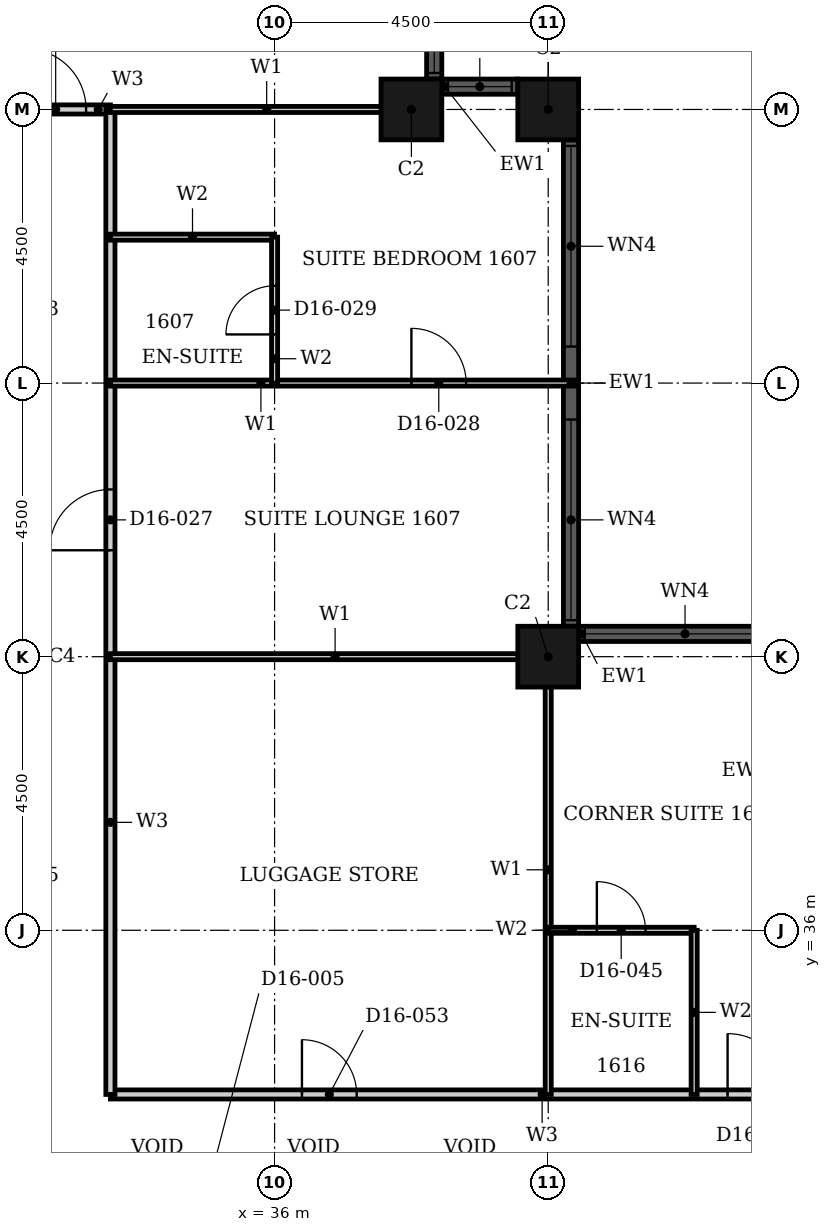
"""IFC4 building model, lengths in metres.
Left out: names, types, materials, properties, quantities, classifications, styles, units other than length and angle.
Written with IfcOpenShell. Run it as: python <this file> out.ifc"""

import sys

from ifc_helpers import new_model, si_unit, direction, frame, frame_2d, origin, origin_2d, place, context, subcontext, project, spatial, rectangle, hollow_rectangle, extrude, element, fill, save


model = new_model("IFC4")
c1 = context("Model", 3, precision=1e-05, world=origin(), true_north=direction((0.0, 1.0)))
c2 = subcontext(c1, "Body", "Model", "MODEL_VIEW")
j1 = project(units=[si_unit("LENGTHUNIT", "METRE"), si_unit("PLANEANGLEUNIT", "RADIAN")], contexts=[c1])
p1 = place(None, origin())
s1 = spatial("IfcSite", under=j1, at=p1, CompositionType="ELEMENT")
p2 = place(p1, origin())
s2 = spatial("IfcBuilding", under=s1, at=p2, CompositionType="ELEMENT")
p3 = place(p2, frame((0.0, 0.0, 70.8)))
s3 = spatial("IfcBuildingStorey", under=s2, at=p3, CompositionType="ELEMENT", Elevation=70.8)
for number, where, z_axis, x_axis in (
    (1, (40.5, 40.5, 0.0), (0.0, 0.0, 1.0), (1.0, 0.0, 0.0)),
    (2, (40.5, 49.5, 0.0), (0.0, 0.0, 1.0), (1.0, 0.0, 0.0)),
    (3, (38.25, 49.5, 0.0), (0.0, 0.0, 1.0), (1.0, 0.0, 0.0)),
):
    element("IfcColumn", number, at=place(p3, frame(where, z_axis=z_axis, x_axis=x_axis)), inside=s3, PredefinedType="COLUMN", context=c2, shape_type="SweptSolid", body=[
        extrude(hollow_rectangle(XDim=1.0, YDim=1.0, WallThickness=0.032, at=origin_2d()), origin(), (0.0, 0.0, 1.0), 3.6),
    ])
p4 = place(p3, frame((44.5, 40.875, 0.0), z_axis=(0.0, 0.0, 1.0), x_axis=(-1.0, 0.0, 0.0)))
e4 = element("IfcWall", 4, at=p4, inside=s3, PredefinedType="SOLIDWALL", context=c2, shape_type="SweptSolid", body=[
    extrude(rectangle(XDim=3.5, YDim=0.25, at=frame_2d((1.75, 0.0))), origin(), (0.0, 0.0, 1.0), 3.6),
])
p5 = place(p4, frame((0.1, 0.0, 0.9)))
e5 = element("IfcOpeningElement", 5, at=p5, cuts=e4, PredefinedType="OPENING", context=c2, shape_type="SweptSolid", body=[
    extrude(rectangle(XDim=3.3, YDim=2.08, at=frame_2d((1.65, 1.04))), frame((0.0, 0.135, 0.0), z_axis=(0.0, -1.0, 0.0), x_axis=(1.0, 0.0, 0.0)), (0.0, 0.0, 1.0), 0.27),
])
p6 = place(p3, frame((40.875, 41.0, 0.0), z_axis=(0.0, 0.0, 1.0), x_axis=(0.0, 1.0, 0.0)))
e6 = element("IfcWall", 6, at=p6, inside=s3, PredefinedType="SOLIDWALL", context=c2, shape_type="SweptSolid", body=[
    extrude(rectangle(XDim=8.0, YDim=0.25, at=frame_2d((4.0, 0.0))), origin(), (0.0, 0.0, 1.0), 3.6),
])
p7 = place(p6, frame((0.1, 0.0, 0.9)))
e7 = element("IfcOpeningElement", 7, at=p7, cuts=e6, PredefinedType="OPENING", context=c2, shape_type="SweptSolid", body=[
    extrude(rectangle(XDim=3.3, YDim=2.08, at=frame_2d((1.65, 1.04))), frame((0.0, 0.135, 0.0), z_axis=(0.0, -1.0, 0.0), x_axis=(1.0, 0.0, 0.0)), (0.0, 0.0, 1.0), 0.27),
])
p8 = place(p6, frame((4.6, 0.0, 0.9)))
e8 = element("IfcOpeningElement", 8, at=p8, cuts=e6, PredefinedType="OPENING", context=c2, shape_type="SweptSolid", body=[
    extrude(rectangle(XDim=3.3, YDim=2.08, at=frame_2d((1.65, 1.04))), frame((0.0, 0.135, 0.0), z_axis=(0.0, -1.0, 0.0), x_axis=(1.0, 0.0, 0.0)), (0.0, 0.0, 1.0), 0.27),
])
p9 = place(p3, frame((40.0, 49.875, 0.0), z_axis=(0.0, 0.0, 1.0), x_axis=(-1.0, 0.0, 0.0)))
e9 = element("IfcWall", 9, at=p9, inside=s3, PredefinedType="SOLIDWALL", context=c2, shape_type="SweptSolid", body=[
    extrude(rectangle(XDim=1.25, YDim=0.25, at=frame_2d((0.625, 0.0))), origin(), (0.0, 0.0, 1.0), 3.6),
])
p10 = place(p9, frame((0.1, 0.0, 0.9)))
e10 = element("IfcOpeningElement", 10, at=p10, cuts=e9, PredefinedType="OPENING", context=c2, shape_type="SweptSolid", body=[
    extrude(rectangle(XDim=1.05, YDim=2.08, at=frame_2d((0.525, 1.04))), frame((0.0, 0.135, 0.0), z_axis=(0.0, -1.0, 0.0), x_axis=(1.0, 0.0, 0.0)), (0.0, 0.0, 1.0), 0.27),
])
p11 = place(p3, frame((38.625, 50.0, 0.0), z_axis=(0.0, 0.0, 1.0), x_axis=(0.0, 1.0, 0.0)))
e11 = element("IfcWall", 11, at=p11, inside=s3, PredefinedType="SOLIDWALL", context=c2, shape_type="SweptSolid", body=[
    extrude(rectangle(XDim=1.25, YDim=0.25, at=frame_2d((0.625, 0.0))), origin(), (0.0, 0.0, 1.0), 3.6),
])
p12 = place(p11, frame((0.1, 0.0, 0.9)))
e12 = element("IfcOpeningElement", 12, at=p12, cuts=e11, PredefinedType="OPENING", context=c2, shape_type="SweptSolid", body=[
    extrude(rectangle(XDim=1.05, YDim=2.08, at=frame_2d((0.525, 1.04))), frame((0.0, 0.135, 0.0), z_axis=(0.0, -1.0, 0.0), x_axis=(1.0, 0.0, 0.0)), (0.0, 0.0, 1.0), 0.27),
])
p13 = place(p3, frame((33.3, 33.3, 0.0), z_axis=(0.0, 0.0, 1.0), x_axis=(1.0, 0.0, 0.0)))
e13 = element("IfcWall", 13, at=p13, inside=s3, PredefinedType="PARTITIONING", context=c2, shape_type="SweptSolid", body=[
    extrude(rectangle(XDim=13.5, YDim=0.15, at=frame_2d((6.75, 0.0))), origin(), (0.0, 0.0, 1.0), 3.3),
])
p14 = place(p13, frame((10.15, 0.0, 0.0)))
e14 = element("IfcOpeningElement", 14, at=p14, cuts=e13, PredefinedType="OPENING", context=c2, shape_type="SweptSolid", body=[
    extrude(rectangle(XDim=1.0, YDim=2.1, at=frame_2d((0.5, 1.05))), frame((0.0, 0.085, 0.0), z_axis=(0.0, -1.0, 0.0), x_axis=(1.0, 0.0, 0.0)), (0.0, 0.0, 1.0), 0.17),
])
p15 = place(p13, frame((3.15, 0.0, 0.0)))
e15 = element("IfcOpeningElement", 15, at=p15, cuts=e13, PredefinedType="OPENING", context=c2, shape_type="SweptSolid", body=[
    extrude(rectangle(XDim=0.9, YDim=2.1, at=frame_2d((0.45, 1.05))), frame((0.0, 0.085, 0.0), z_axis=(0.0, -1.0, 0.0), x_axis=(1.0, 0.0, 0.0)), (0.0, 0.0, 1.0), 0.17),
])
p16 = place(p3, frame((31.5, 49.5, 0.0), z_axis=(0.0, 0.0, 1.0), x_axis=(1.0, 0.0, 0.0)))
e16 = element("IfcWall", 16, at=p16, inside=s3, PredefinedType="PARTITIONING", context=c2, shape_type="SweptSolid", body=[
    extrude(rectangle(XDim=1.8, YDim=0.15, at=frame_2d((0.9, 0.0))), origin(), (0.0, 0.0, 1.0), 3.3),
])
p17 = place(p16, frame((0.4, 0.0, 0.0)))
e17 = element("IfcOpeningElement", 17, at=p17, cuts=e16, PredefinedType="OPENING", context=c2, shape_type="SweptSolid", body=[
    extrude(rectangle(XDim=1.0, YDim=2.1, at=frame_2d((0.5, 1.05))), frame((0.0, 0.085, 0.0), z_axis=(0.0, -1.0, 0.0), x_axis=(1.0, 0.0, 0.0)), (0.0, 0.0, 1.0), 0.17),
])
p18 = place(p3, frame((33.3, 33.3, 0.0), z_axis=(0.0, 0.0, 1.0), x_axis=(0.0, 1.0, 0.0)))
e18 = element("IfcWall", 18, at=p18, inside=s3, PredefinedType="PARTITIONING", context=c2, shape_type="SweptSolid", body=[
    extrude(rectangle(XDim=16.2, YDim=0.15, at=frame_2d((8.1, 0.0))), origin(), (0.0, 0.0, 1.0), 3.3),
])
p19 = place(p18, frame((8.95, 0.0, 0.0)))
e19 = element("IfcOpeningElement", 19, at=p19, cuts=e18, PredefinedType="OPENING", context=c2, shape_type="SweptSolid", body=[
    extrude(rectangle(XDim=1.0, YDim=2.1, at=frame_2d((0.5, 1.05))), frame((0.0, 0.085, 0.0), z_axis=(0.0, -1.0, 0.0), x_axis=(1.0, 0.0, 0.0)), (0.0, 0.0, 1.0), 0.17),
])
p20 = place(p3, frame((33.3, 40.5, 0.0), z_axis=(0.0, 0.0, 1.0), x_axis=(1.0, 0.0, 0.0)))
e20 = element("IfcWall", 20, at=p20, inside=s3, PredefinedType="PARTITIONING", context=c2, shape_type="SweptSolid", body=[
    extrude(rectangle(XDim=7.39, YDim=0.1, at=frame_2d((3.695, 0.0))), origin(), (0.0, 0.0, 1.0), 2.38),
])
p21 = place(p3, frame((33.3, 45.0, 0.0), z_axis=(0.0, 0.0, 1.0), x_axis=(1.0, 0.0, 0.0)))
e21 = element("IfcWall", 21, at=p21, inside=s3, PredefinedType="PARTITIONING", context=c2, shape_type="SweptSolid", body=[
    extrude(rectangle(XDim=7.64, YDim=0.1, at=frame_2d((3.82, 0.0))), origin(), (0.0, 0.0, 1.0), 3.3),
])
p22 = place(p21, frame((4.95, 0.0, 0.0)))
e22 = element("IfcOpeningElement", 22, at=p22, cuts=e21, PredefinedType="OPENING", context=c2, shape_type="SweptSolid", body=[
    extrude(rectangle(XDim=0.9, YDim=2.1, at=frame_2d((0.45, 1.05))), frame((0.0, 0.06, 0.0), z_axis=(0.0, -1.0, 0.0), x_axis=(1.0, 0.0, 0.0)), (0.0, 0.0, 1.0), 0.12),
])
p23 = place(p3, frame((33.3, 49.5, 0.0), z_axis=(0.0, 0.0, 1.0), x_axis=(1.0, 0.0, 0.0)))
e23 = element("IfcWall", 23, at=p23, inside=s3, PredefinedType="PARTITIONING", context=c2, shape_type="SweptSolid", body=[
    extrude(rectangle(XDim=5.14, YDim=0.1, at=frame_2d((2.57, 0.0))), origin(), (0.0, 0.0, 1.0), 3.3),
])
p24 = place(p3, frame((40.5, 33.3, 0.0), z_axis=(0.0, 0.0, 1.0), x_axis=(0.0, 1.0, 0.0)))
e24 = element("IfcWall", 24, at=p24, inside=s3, PredefinedType="PARTITIONING", context=c2, shape_type="SweptSolid", body=[
    extrude(rectangle(XDim=7.39, YDim=0.1, at=frame_2d((3.695, 0.0))), origin(), (0.0, 0.0, 1.0), 3.3),
])
p25 = place(p3, frame((40.5, 36.0, 0.0), z_axis=(0.0, 0.0, 1.0), x_axis=(1.0, 0.0, 0.0)))
e25 = element("IfcWall", 25, at=p25, inside=s3, PredefinedType="PARTITIONING", context=c2, shape_type="SweptSolid", body=[
    extrude(rectangle(XDim=2.4, YDim=0.1, at=frame_2d((1.2, 0.0))), origin(), (0.0, 0.0, 1.0), 3.3),
])
p26 = place(p25, frame((0.8, 0.0, 0.0)))
e26 = element("IfcOpeningElement", 26, at=p26, cuts=e25, PredefinedType="OPENING", context=c2, shape_type="SweptSolid", body=[
    extrude(rectangle(XDim=0.8, YDim=2.1, at=frame_2d((0.4, 1.05))), frame((0.0, 0.06, 0.0), z_axis=(0.0, -1.0, 0.0), x_axis=(1.0, 0.0, 0.0)), (0.0, 0.0, 1.0), 0.12),
])
p27 = place(p3, frame((33.3, 47.4, 0.0), z_axis=(0.0, 0.0, 1.0), x_axis=(1.0, 0.0, 0.0)))
e27 = element("IfcWall", 27, at=p27, inside=s3, PredefinedType="PARTITIONING", context=c2, shape_type="SweptSolid", body=[
    extrude(rectangle(XDim=2.7, YDim=0.1, at=frame_2d((1.35, 0.0))), origin(), (0.0, 0.0, 1.0), 3.3),
])
p28 = place(p3, frame((36.0, 45.0, 0.0), z_axis=(0.0, 0.0, 1.0), x_axis=(0.0, 1.0, 0.0)))
e28 = element("IfcWall", 28, at=p28, inside=s3, PredefinedType="PARTITIONING", context=c2, shape_type="SweptSolid", body=[
    extrude(rectangle(XDim=2.4, YDim=0.1, at=frame_2d((1.2, 0.0))), origin(), (0.0, 0.0, 1.0), 2.58),
])
p29 = place(p28, frame((0.8, 0.0, 0.0)))
e29 = element("IfcOpeningElement", 29, at=p29, cuts=e28, PredefinedType="OPENING", context=c2, shape_type="SweptSolid", body=[
    extrude(rectangle(XDim=0.8, YDim=2.1, at=frame_2d((0.4, 1.05))), frame((0.0, 0.06, 0.0), z_axis=(0.0, -1.0, 0.0), x_axis=(1.0, 0.0, 0.0)), (0.0, 0.0, 1.0), 0.12),
])
p30 = place(p3, frame((42.9, 33.3, 0.0), z_axis=(0.0, 0.0, 1.0), x_axis=(0.0, 1.0, 0.0)))
e30 = element("IfcWall", 30, at=p30, inside=s3, PredefinedType="PARTITIONING", context=c2, shape_type="SweptSolid", body=[
    extrude(rectangle(XDim=2.7, YDim=0.1, at=frame_2d((1.35, 0.0))), origin(), (0.0, 0.0, 1.0), 3.3),
])
p31 = place(p5, origin())
e31 = element("IfcWindow", 31, at=p31, inside=s3, PartitioningType="SINGLE_PANEL", PredefinedType="WINDOW", context=c2, shape_type="SweptSolid", body=[
    extrude(rectangle(XDim=3.3, YDim=2.08, at=frame_2d((1.65, 1.04))), frame((0.0, 0.03, 0.0), z_axis=(0.0, -1.0, 0.0), x_axis=(1.0, 0.0, 0.0)), (0.0, 0.0, 1.0), 0.06),
])
fill(e5, e31)
p32 = place(p7, origin())
e32 = element("IfcWindow", 32, at=p32, inside=s3, PartitioningType="SINGLE_PANEL", PredefinedType="WINDOW", context=c2, shape_type="SweptSolid", body=[
    extrude(rectangle(XDim=3.3, YDim=2.08, at=frame_2d((1.65, 1.04))), frame((0.0, 0.03, 0.0), z_axis=(0.0, -1.0, 0.0), x_axis=(1.0, 0.0, 0.0)), (0.0, 0.0, 1.0), 0.06),
])
fill(e7, e32)
p33 = place(p8, origin())
e33 = element("IfcWindow", 33, at=p33, inside=s3, PartitioningType="SINGLE_PANEL", PredefinedType="WINDOW", context=c2, shape_type="SweptSolid", body=[
    extrude(rectangle(XDim=3.3, YDim=2.08, at=frame_2d((1.65, 1.04))), frame((0.0, 0.03, 0.0), z_axis=(0.0, -1.0, 0.0), x_axis=(1.0, 0.0, 0.0)), (0.0, 0.0, 1.0), 0.06),
])
fill(e8, e33)
p34 = place(p10, origin())
e34 = element("IfcWindow", 34, at=p34, inside=s3, PartitioningType="SINGLE_PANEL", PredefinedType="WINDOW", context=c2, shape_type="SweptSolid", body=[
    extrude(rectangle(XDim=1.05, YDim=2.08, at=frame_2d((0.525, 1.04))), frame((0.0, 0.03, 0.0), z_axis=(0.0, -1.0, 0.0), x_axis=(1.0, 0.0, 0.0)), (0.0, 0.0, 1.0), 0.06),
])
fill(e10, e34)
p35 = place(p12, origin())
e35 = element("IfcWindow", 35, at=p35, inside=s3, PartitioningType="SINGLE_PANEL", PredefinedType="WINDOW", context=c2, shape_type="SweptSolid", body=[
    extrude(rectangle(XDim=1.05, YDim=2.08, at=frame_2d((0.525, 1.04))), frame((0.0, 0.03, 0.0), z_axis=(0.0, -1.0, 0.0), x_axis=(1.0, 0.0, 0.0)), (0.0, 0.0, 1.0), 0.06),
])
fill(e12, e35)
p36 = place(p19, origin())
e36 = element("IfcDoor", 36, at=p36, inside=s3, OperationType="SINGLE_SWING_RIGHT", PredefinedType="DOOR", context=c2, shape_type="SweptSolid", body=[
    extrude(rectangle(XDim=1.0, YDim=2.1, at=frame_2d((0.5, 1.05))), frame((0.0, 0.025, 0.0), z_axis=(0.0, -1.0, 0.0), x_axis=(1.0, 0.0, 0.0)), (0.0, 0.0, 1.0), 0.05),
])
fill(e19, e36)
p37 = place(p22, origin())
e37 = element("IfcDoor", 37, at=p37, inside=s3, OperationType="SINGLE_SWING_RIGHT", PredefinedType="DOOR", context=c2, shape_type="SweptSolid", body=[
    extrude(rectangle(XDim=0.9, YDim=2.1, at=frame_2d((0.45, 1.05))), frame((0.0, 0.025, 0.0), z_axis=(0.0, -1.0, 0.0), x_axis=(1.0, 0.0, 0.0)), (0.0, 0.0, 1.0), 0.05),
])
fill(e22, e37)
p38 = place(p29, origin())
e38 = element("IfcDoor", 38, at=p38, inside=s3, OperationType="SINGLE_SWING_LEFT", PredefinedType="DOOR", context=c2, shape_type="SweptSolid", body=[
    extrude(rectangle(XDim=0.8, YDim=2.1, at=frame_2d((0.4, 1.05))), frame((0.0, 0.025, 0.0), z_axis=(0.0, -1.0, 0.0), x_axis=(1.0, 0.0, 0.0)), (0.0, 0.0, 1.0), 0.05),
])
fill(e29, e38)
p39 = place(p17, origin())
e39 = element("IfcDoor", 39, at=p39, inside=s3, OperationType="SINGLE_SWING_LEFT", PredefinedType="DOOR", context=c2, shape_type="SweptSolid", body=[
    extrude(rectangle(XDim=1.0, YDim=2.1, at=frame_2d((0.5, 1.05))), frame((0.0, 0.025, 0.0), z_axis=(0.0, -1.0, 0.0), x_axis=(1.0, 0.0, 0.0)), (0.0, 0.0, 1.0), 0.05),
])
fill(e17, e39)
p40 = place(p14, origin())
e40 = element("IfcDoor", 40, at=p40, inside=s3, OperationType="SINGLE_SWING_RIGHT", PredefinedType="DOOR", context=c2, shape_type="SweptSolid", body=[
    extrude(rectangle(XDim=1.0, YDim=2.1, at=frame_2d((0.5, 1.05))), frame((0.0, 0.025, 0.0), z_axis=(0.0, -1.0, 0.0), x_axis=(1.0, 0.0, 0.0)), (0.0, 0.0, 1.0), 0.05),
])
fill(e14, e40)
p41 = place(p26, origin())
e41 = element("IfcDoor", 41, at=p41, inside=s3, OperationType="SINGLE_SWING_LEFT", PredefinedType="DOOR", context=c2, shape_type="SweptSolid", body=[
    extrude(rectangle(XDim=0.8, YDim=2.1, at=frame_2d((0.4, 1.05))), frame((0.0, 0.025, 0.0), z_axis=(0.0, -1.0, 0.0), x_axis=(1.0, 0.0, 0.0)), (0.0, 0.0, 1.0), 0.05),
])
fill(e26, e41)
p42 = place(p15, origin())
e42 = element("IfcDoor", 42, at=p42, inside=s3, OperationType="SINGLE_SWING_LEFT", PredefinedType="DOOR", context=c2, shape_type="SweptSolid", body=[
    extrude(rectangle(XDim=0.9, YDim=2.1, at=frame_2d((0.45, 1.05))), frame((0.0, 0.025, 0.0), z_axis=(0.0, -1.0, 0.0), x_axis=(1.0, 0.0, 0.0)), (0.0, 0.0, 1.0), 0.05),
])
fill(e15, e42)
save(model, sys.argv[1])
